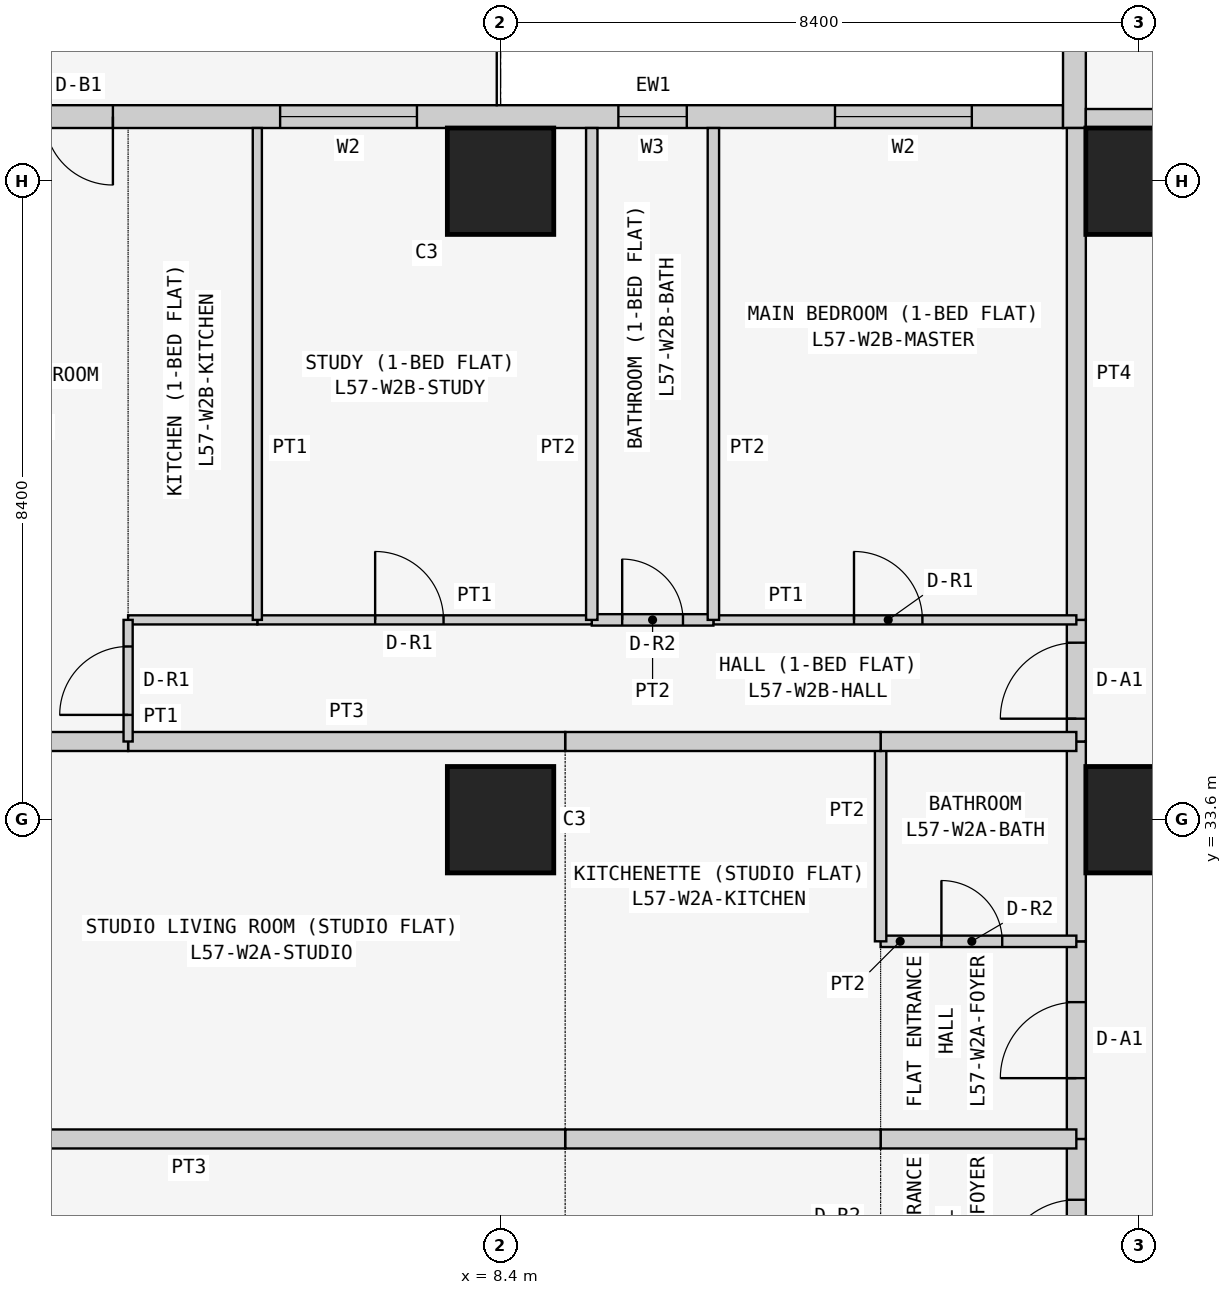
"""IFC4 building model, lengths in metres.
Left out: names, types, materials, properties, quantities, classifications, styles, units other than length and angle.
Written with IfcOpenShell. Run it as: python <this file> out.ifc"""

import sys

from ifc_helpers import new_model, si_unit, direction, frame, frame_2d, origin, origin_2d, place, context, subcontext, project, spatial, rectangle, extrude, element, fill, save


model = new_model("IFC4")
c1 = context("Model", 3, precision=1e-05, world=origin(), true_north=direction((0.0, 1.0)))
c2 = subcontext(c1, "Body", "Model", "MODEL_VIEW")
j1 = project(units=[si_unit("LENGTHUNIT", "METRE"), si_unit("PLANEANGLEUNIT", "RADIAN")], contexts=[c1])
p1 = place(None, origin())
s1 = spatial("IfcSite", under=j1, at=p1, CompositionType="ELEMENT")
p2 = place(p1, origin())
s2 = spatial("IfcBuilding", under=s1, at=p2, CompositionType="ELEMENT")
p3 = place(p2, frame((0.0, 0.0, 219.3)))
s3 = spatial("IfcBuildingStorey", under=s2, at=p3, CompositionType="ELEMENT", Elevation=219.3)
for number, where, z_axis, x_axis in (
    (1, (8.4, 33.6, 0.0), (0.0, 0.0, 1.0), (1.0, 0.0, 0.0)),
    (2, (8.4, 42.0, 0.0), (0.0, 0.0, 1.0), (1.0, 0.0, 0.0)),
    (3, (16.8, 33.6, 0.0), (0.0, 0.0, 1.0), (1.0, 0.0, 0.0)),
    (4, (16.8, 42.0, 0.0), (0.0, 0.0, 1.0), (1.0, 0.0, 0.0)),
):
    element("IfcColumn", number, at=place(p3, frame(where, z_axis=z_axis, x_axis=x_axis)), inside=s3, PredefinedType="COLUMN", context=c2, shape_type="SweptSolid", body=[
        extrude(rectangle(XDim=1.4, YDim=1.4, at=origin_2d()), origin(), (0.0, 0.0, 1.0), 3.6),
    ])
p4 = place(p3, frame((15.8, 42.85, 0.0), z_axis=(0.0, 0.0, 1.0), x_axis=(-1.0, 0.0, 0.0)))
e5 = element("IfcWall", 5, at=p4, inside=s3, PredefinedType="SOLIDWALL", context=c2, shape_type="SweptSolid", body=[
    extrude(rectangle(XDim=15.4, YDim=0.3, at=frame_2d((7.7, 0.0))), origin(), (0.0, 0.0, 1.0), 3.45),
])
p5 = place(p4, frame((1.2, 0.0, 0.9)))
e6 = element("IfcOpeningElement", 6, at=p5, cuts=e5, PredefinedType="OPENING", context=c2, shape_type="SweptSolid", body=[
    extrude(rectangle(XDim=1.8, YDim=1.5, at=frame_2d((0.9, 0.75))), frame((0.0, 0.16, 0.0), z_axis=(0.0, -1.0, 0.0), x_axis=(1.0, 0.0, 0.0)), (0.0, 0.0, 1.0), 0.32),
])
p6 = place(p4, frame((4.95, 0.0, 1.5)))
e7 = element("IfcOpeningElement", 7, at=p6, cuts=e5, PredefinedType="OPENING", context=c2, shape_type="SweptSolid", body=[
    extrude(rectangle(XDim=0.9, YDim=0.7, at=frame_2d((0.45, 0.35))), frame((0.0, 0.16, 0.0), z_axis=(0.0, -1.0, 0.0), x_axis=(1.0, 0.0, 0.0)), (0.0, 0.0, 1.0), 0.32),
])
p7 = place(p4, frame((8.5, 0.0, 0.9)))
e8 = element("IfcOpeningElement", 8, at=p7, cuts=e5, PredefinedType="OPENING", context=c2, shape_type="SweptSolid", body=[
    extrude(rectangle(XDim=1.8, YDim=1.5, at=frame_2d((0.9, 0.75))), frame((0.0, 0.16, 0.0), z_axis=(0.0, -1.0, 0.0), x_axis=(1.0, 0.0, 0.0)), (0.0, 0.0, 1.0), 0.32),
])
p8 = place(p4, frame((12.5, 0.0, 0.0)))
e9 = element("IfcOpeningElement", 9, at=p8, cuts=e5, PredefinedType="OPENING", context=c2, shape_type="SweptSolid", body=[
    extrude(rectangle(XDim=0.9, YDim=2.4, at=frame_2d((0.45, 1.2))), frame((0.0, 0.16, 0.0), z_axis=(0.0, -1.0, 0.0), x_axis=(1.0, 0.0, 0.0)), (0.0, 0.0, 1.0), 0.32),
])
p9 = place(p4, frame((13.5, 0.0, 0.9)))
e10 = element("IfcOpeningElement", 10, at=p9, cuts=e5, PredefinedType="OPENING", context=c2, shape_type="SweptSolid", body=[
    extrude(rectangle(XDim=1.2, YDim=1.5, at=frame_2d((0.6, 0.75))), frame((0.0, 0.16, 0.0), z_axis=(0.0, -1.0, 0.0), x_axis=(1.0, 0.0, 0.0)), (0.0, 0.0, 1.0), 0.32),
])
p10 = place(p3, frame((15.95, 50.0, 0.0), z_axis=(0.0, 0.0, 1.0), x_axis=(0.0, -1.0, 0.0)))
e11 = element("IfcWall", 11, at=p10, inside=s3, PredefinedType="SOLIDWALL", context=c2, shape_type="SweptSolid", body=[
    extrude(rectangle(XDim=7.3, YDim=0.3, at=frame_2d((3.65, 0.0))), origin(), (0.0, 0.0, 1.0), 3.45),
])
p11 = place(p10, frame((3.1, 0.0, 0.9)))
e12 = element("IfcOpeningElement", 12, at=p11, cuts=e11, PredefinedType="OPENING", context=c2, shape_type="SweptSolid", body=[
    extrude(rectangle(XDim=2.4, YDim=1.5, at=frame_2d((1.2, 0.75))), frame((0.0, 0.16, 0.0), z_axis=(0.0, -1.0, 0.0), x_axis=(1.0, 0.0, 0.0)), (0.0, 0.0, 1.0), 0.32),
])
p12 = place(p10, frame((0.75, 0.0, 0.9)))
e13 = element("IfcOpeningElement", 13, at=p12, cuts=e11, PredefinedType="OPENING", context=c2, shape_type="SweptSolid", body=[
    extrude(rectangle(XDim=1.2, YDim=1.5, at=frame_2d((0.6, 0.75))), frame((0.0, 0.16, 0.0), z_axis=(0.0, -1.0, 0.0), x_axis=(1.0, 0.0, 0.0)), (0.0, 0.0, 1.0), 0.32),
])
p13 = place(p3, frame((16.1, 42.825, 0.0), z_axis=(0.0, 0.0, 1.0), x_axis=(1.0, 0.0, 0.0)))
e14 = element("IfcWall", 14, at=p13, inside=s3, PredefinedType="PARTITIONING", context=c2, shape_type="SweptSolid", body=[
    extrude(rectangle(XDim=6.471, YDim=0.25, at=frame_2d((3.235, 0.0))), origin(), (0.0, 0.0, 1.0), 3.45),
])
p14 = place(p3, frame((15.975, 26.8, 0.0), z_axis=(0.0, 0.0, 1.0), x_axis=(0.0, 1.0, 0.0)))
e15 = element("IfcWall", 15, at=p14, inside=s3, PredefinedType="PARTITIONING", context=c2, shape_type="SweptSolid", body=[
    extrude(rectangle(XDim=2.6, YDim=0.25, at=frame_2d((1.3, 0.0))), origin(), (0.0, 0.0, 1.0), 3.45),
])
p15 = place(p14, frame((0.8, 0.0, 0.0)))
e16 = element("IfcOpeningElement", 16, at=p15, cuts=e15, PredefinedType="OPENING", context=c2, shape_type="SweptSolid", body=[
    extrude(rectangle(XDim=1.0, YDim=2.1, at=frame_2d((0.5, 1.05))), frame((0.0, 0.135, 0.0), z_axis=(0.0, -1.0, 0.0), x_axis=(1.0, 0.0, 0.0)), (0.0, 0.0, 1.0), 0.27),
])
p16 = place(p3, frame((15.975, 29.4, 0.0), z_axis=(0.0, 0.0, 1.0), x_axis=(0.0, 1.0, 0.0)))
e17 = element("IfcWall", 17, at=p16, inside=s3, PredefinedType="PARTITIONING", context=c2, shape_type="SweptSolid", body=[
    extrude(rectangle(XDim=2.6, YDim=0.25, at=frame_2d((1.3, 0.0))), origin(), (0.0, 0.0, 1.0), 3.45),
])
p17 = place(p16, frame((0.8, 0.0, 0.0)))
e18 = element("IfcOpeningElement", 18, at=p17, cuts=e17, PredefinedType="OPENING", context=c2, shape_type="SweptSolid", body=[
    extrude(rectangle(XDim=1.0, YDim=2.1, at=frame_2d((0.5, 1.05))), frame((0.0, 0.135, 0.0), z_axis=(0.0, -1.0, 0.0), x_axis=(1.0, 0.0, 0.0)), (0.0, 0.0, 1.0), 0.27),
])
p18 = place(p3, frame((15.975, 32.0, 0.0), z_axis=(0.0, 0.0, 1.0), x_axis=(0.0, 1.0, 0.0)))
e19 = element("IfcWall", 19, at=p18, inside=s3, PredefinedType="PARTITIONING", context=c2, shape_type="SweptSolid", body=[
    extrude(rectangle(XDim=2.629, YDim=0.25, at=frame_2d((1.314, 0.0))), origin(), (0.0, 0.0, 1.0), 3.45),
])
p19 = place(p3, frame((15.975, 34.629, 0.0), z_axis=(0.0, 0.0, 1.0), x_axis=(0.0, 1.0, 0.0)))
e20 = element("IfcWall", 20, at=p19, inside=s3, PredefinedType="PARTITIONING", context=c2, shape_type="SweptSolid", body=[
    extrude(rectangle(XDim=1.6, YDim=0.25, at=frame_2d((0.8, 0.0))), origin(), (0.0, 0.0, 1.0), 3.45),
])
p20 = place(p19, frame((0.3, 0.0, 0.0)))
e21 = element("IfcOpeningElement", 21, at=p20, cuts=e20, PredefinedType="OPENING", context=c2, shape_type="SweptSolid", body=[
    extrude(rectangle(XDim=1.0, YDim=2.1, at=frame_2d((0.5, 1.05))), frame((0.0, 0.135, 0.0), z_axis=(0.0, -1.0, 0.0), x_axis=(1.0, 0.0, 0.0)), (0.0, 0.0, 1.0), 0.27),
])
p21 = place(p3, frame((15.975, 36.229, 0.0), z_axis=(0.0, 0.0, 1.0), x_axis=(0.0, 1.0, 0.0)))
e22 = element("IfcWall", 22, at=p21, inside=s3, PredefinedType="PARTITIONING", context=c2, shape_type="SweptSolid", body=[
    extrude(rectangle(XDim=6.471, YDim=0.25, at=frame_2d((3.235, 0.0))), origin(), (0.0, 0.0, 1.0), 3.45),
])
p22 = place(p3, frame((15.975, 29.4, 0.0), z_axis=(0.0, 0.0, 1.0), x_axis=(-1.0, 0.0, 0.0)))
e23 = element("IfcWall", 23, at=p22, inside=s3, PredefinedType="PARTITIONING", context=c2, shape_type="SweptSolid", body=[
    extrude(rectangle(XDim=2.575, YDim=0.25, at=frame_2d((1.288, 0.0))), origin(), (0.0, 0.0, 1.0), 3.45),
])
p23 = place(p3, frame((13.4, 29.4, 0.0), z_axis=(0.0, 0.0, 1.0), x_axis=(-1.0, 0.0, 0.0)))
e24 = element("IfcWall", 24, at=p23, inside=s3, PredefinedType="PARTITIONING", context=c2, shape_type="SweptSolid", body=[
    extrude(rectangle(XDim=4.15, YDim=0.25, at=frame_2d((2.075, 0.0))), origin(), (0.0, 0.0, 1.0), 3.45),
])
p24 = place(p3, frame((9.25, 29.4, 0.0), z_axis=(0.0, 0.0, 1.0), x_axis=(-1.0, 0.0, 0.0)))
e25 = element("IfcWall", 25, at=p24, inside=s3, PredefinedType="PARTITIONING", context=c2, shape_type="SweptSolid", body=[
    extrude(rectangle(XDim=9.9, YDim=0.25, at=frame_2d((4.95, 0.0))), origin(), (0.0, 0.0, 1.0), 3.45),
])
p25 = place(p3, frame((13.4, 32.0, 0.0), z_axis=(0.0, 0.0, 1.0), x_axis=(1.0, 0.0, 0.0)))
e26 = element("IfcWall", 26, at=p25, inside=s3, PredefinedType="PARTITIONING", context=c2, shape_type="SweptSolid", body=[
    extrude(rectangle(XDim=2.575, YDim=0.15, at=frame_2d((1.288, 0.0))), origin(), (0.0, 0.0, 1.0), 3.45),
])
p26 = place(p25, frame((0.8, 0.0, 0.0)))
e27 = element("IfcOpeningElement", 27, at=p26, cuts=e26, PredefinedType="OPENING", context=c2, shape_type="SweptSolid", body=[
    extrude(rectangle(XDim=0.8, YDim=2.1, at=frame_2d((0.4, 1.05))), frame((0.0, 0.085, 0.0), z_axis=(0.0, -1.0, 0.0), x_axis=(1.0, 0.0, 0.0)), (0.0, 0.0, 1.0), 0.17),
])
p27 = place(p3, frame((13.4, 32.0, 0.0), z_axis=(0.0, 0.0, 1.0), x_axis=(0.0, 1.0, 0.0)))
e28 = element("IfcWall", 28, at=p27, inside=s3, PredefinedType="PARTITIONING", context=c2, shape_type="SweptSolid", body=[
    extrude(rectangle(XDim=2.629, YDim=0.15, at=frame_2d((1.314, 0.0))), origin(), (0.0, 0.0, 1.0), 3.45),
])
p28 = place(p3, frame((13.4, 34.629, 0.0), z_axis=(0.0, 0.0, 1.0), x_axis=(1.0, 0.0, 0.0)))
e29 = element("IfcWall", 29, at=p28, inside=s3, PredefinedType="PARTITIONING", context=c2, shape_type="SweptSolid", body=[
    extrude(rectangle(XDim=2.575, YDim=0.25, at=frame_2d((1.288, 0.0))), origin(), (0.0, 0.0, 1.0), 3.45),
])
p29 = place(p3, frame((9.25, 34.629, 0.0), z_axis=(0.0, 0.0, 1.0), x_axis=(1.0, 0.0, 0.0)))
e30 = element("IfcWall", 30, at=p29, inside=s3, PredefinedType="PARTITIONING", context=c2, shape_type="SweptSolid", body=[
    extrude(rectangle(XDim=4.15, YDim=0.25, at=frame_2d((2.075, 0.0))), origin(), (0.0, 0.0, 1.0), 3.45),
])
p30 = place(p3, frame((3.5, 34.629, 0.0), z_axis=(0.0, 0.0, 1.0), x_axis=(1.0, 0.0, 0.0)))
e31 = element("IfcWall", 31, at=p30, inside=s3, PredefinedType="PARTITIONING", context=c2, shape_type="SweptSolid", body=[
    extrude(rectangle(XDim=5.75, YDim=0.25, at=frame_2d((2.875, 0.0))), origin(), (0.0, 0.0, 1.0), 3.45),
])
p31 = place(p3, frame((-0.65, 34.629, 0.0), z_axis=(0.0, 0.0, 1.0), x_axis=(1.0, 0.0, 0.0)))
e32 = element("IfcWall", 32, at=p31, inside=s3, PredefinedType="PARTITIONING", context=c2, shape_type="SweptSolid", body=[
    extrude(rectangle(XDim=4.15, YDim=0.25, at=frame_2d((2.075, 0.0))), origin(), (0.0, 0.0, 1.0), 3.45),
])
p32 = place(p3, frame((11.2, 36.229, 0.0), z_axis=(0.0, 0.0, 1.0), x_axis=(1.0, 0.0, 0.0)))
e33 = element("IfcWall", 33, at=p32, inside=s3, PredefinedType="PARTITIONING", context=c2, shape_type="SweptSolid", body=[
    extrude(rectangle(XDim=4.775, YDim=0.12, at=frame_2d((2.388, 0.0))), origin(), (0.0, 0.0, 1.0), 3.45),
])
p33 = place(p32, frame((1.85, 0.0, 0.0)))
e34 = element("IfcOpeningElement", 34, at=p33, cuts=e33, PredefinedType="OPENING", context=c2, shape_type="SweptSolid", body=[
    extrude(rectangle(XDim=0.9, YDim=2.1, at=frame_2d((0.45, 1.05))), frame((0.0, 0.07, 0.0), z_axis=(0.0, -1.0, 0.0), x_axis=(1.0, 0.0, 0.0)), (0.0, 0.0, 1.0), 0.14),
])
p34 = place(p3, frame((9.6, 36.229, 0.0), z_axis=(0.0, 0.0, 1.0), x_axis=(1.0, 0.0, 0.0)))
e35 = element("IfcWall", 35, at=p34, inside=s3, PredefinedType="PARTITIONING", context=c2, shape_type="SweptSolid", body=[
    extrude(rectangle(XDim=1.6, YDim=0.15, at=frame_2d((0.8, 0.0))), origin(), (0.0, 0.0, 1.0), 3.45),
])
p35 = place(p34, frame((0.4, 0.0, 0.0)))
e36 = element("IfcOpeningElement", 36, at=p35, cuts=e35, PredefinedType="OPENING", context=c2, shape_type="SweptSolid", body=[
    extrude(rectangle(XDim=0.8, YDim=2.1, at=frame_2d((0.4, 1.05))), frame((0.0, 0.085, 0.0), z_axis=(0.0, -1.0, 0.0), x_axis=(1.0, 0.0, 0.0)), (0.0, 0.0, 1.0), 0.17),
])
p36 = place(p3, frame((5.2, 36.229, 0.0), z_axis=(0.0, 0.0, 1.0), x_axis=(1.0, 0.0, 0.0)))
e37 = element("IfcWall", 37, at=p36, inside=s3, PredefinedType="PARTITIONING", context=c2, shape_type="SweptSolid", body=[
    extrude(rectangle(XDim=4.4, YDim=0.12, at=frame_2d((2.2, 0.0))), origin(), (0.0, 0.0, 1.0), 3.45),
])
p37 = place(p36, frame((1.55, 0.0, 0.0)))
e38 = element("IfcOpeningElement", 38, at=p37, cuts=e37, PredefinedType="OPENING", context=c2, shape_type="SweptSolid", body=[
    extrude(rectangle(XDim=0.9, YDim=2.1, at=frame_2d((0.45, 1.05))), frame((0.0, 0.07, 0.0), z_axis=(0.0, -1.0, 0.0), x_axis=(1.0, 0.0, 0.0)), (0.0, 0.0, 1.0), 0.14),
])
p38 = place(p3, frame((3.5, 36.229, 0.0), z_axis=(0.0, 0.0, 1.0), x_axis=(1.0, 0.0, 0.0)))
e39 = element("IfcWall", 39, at=p38, inside=s3, PredefinedType="PARTITIONING", context=c2, shape_type="SweptSolid", body=[
    extrude(rectangle(XDim=1.7, YDim=0.12, at=frame_2d((0.85, 0.0))), origin(), (0.0, 0.0, 1.0), 3.45),
])
p39 = place(p3, frame((3.5, 34.629, 0.0), z_axis=(0.0, 0.0, 1.0), x_axis=(0.0, 1.0, 0.0)))
e40 = element("IfcWall", 40, at=p39, inside=s3, PredefinedType="PARTITIONING", context=c2, shape_type="SweptSolid", body=[
    extrude(rectangle(XDim=1.6, YDim=0.12, at=frame_2d((0.8, 0.0))), origin(), (0.0, 0.0, 1.0), 3.45),
])
p40 = place(p39, frame((0.35, 0.0, 0.0)))
e41 = element("IfcOpeningElement", 41, at=p40, cuts=e40, PredefinedType="OPENING", context=c2, shape_type="SweptSolid", body=[
    extrude(rectangle(XDim=0.9, YDim=2.1, at=frame_2d((0.45, 1.05))), frame((0.0, 0.07, 0.0), z_axis=(0.0, -1.0, 0.0), x_axis=(1.0, 0.0, 0.0)), (0.0, 0.0, 1.0), 0.14),
])
for number, where, z_axis, x_axis in (
    (42, (11.2, 36.229, 0.0), (0.0, 0.0, 1.0), (0.0, 1.0, 0.0)),
    (43, (9.6, 36.229, 0.0), (0.0, 0.0, 1.0), (0.0, 1.0, 0.0)),
):
    element("IfcWall", number, at=place(p3, frame(where, z_axis=z_axis, x_axis=x_axis)), inside=s3, PredefinedType="PARTITIONING", context=c2, shape_type="SweptSolid", body=[
        extrude(rectangle(XDim=6.471, YDim=0.15, at=frame_2d((3.235, 0.0))), origin(), (0.0, 0.0, 1.0), 3.45),
    ])
p41 = place(p3, frame((5.2, 36.229, 0.0), z_axis=(0.0, 0.0, 1.0), x_axis=(0.0, 1.0, 0.0)))
e44 = element("IfcWall", 44, at=p41, inside=s3, PredefinedType="PARTITIONING", context=c2, shape_type="SweptSolid", body=[
    extrude(rectangle(XDim=6.471, YDim=0.12, at=frame_2d((3.235, 0.0))), origin(), (0.0, 0.0, 1.0), 3.45),
])
p42 = place(p5, origin())
e45 = element("IfcWindow", 45, at=p42, inside=s3, PartitioningType="SINGLE_PANEL", PredefinedType="WINDOW", context=c2, shape_type="SweptSolid", body=[
    extrude(rectangle(XDim=1.8, YDim=1.5, at=frame_2d((0.9, 0.75))), frame((0.0, 0.03, 0.0), z_axis=(0.0, -1.0, 0.0), x_axis=(1.0, 0.0, 0.0)), (0.0, 0.0, 1.0), 0.06),
])
fill(e6, e45)
p43 = place(p6, origin())
e46 = element("IfcWindow", 46, at=p43, inside=s3, PartitioningType="SINGLE_PANEL", PredefinedType="WINDOW", context=c2, shape_type="SweptSolid", body=[
    extrude(rectangle(XDim=0.9, YDim=0.7, at=frame_2d((0.45, 0.35))), frame((0.0, 0.03, 0.0), z_axis=(0.0, -1.0, 0.0), x_axis=(1.0, 0.0, 0.0)), (0.0, 0.0, 1.0), 0.06),
])
fill(e7, e46)
p44 = place(p7, origin())
e47 = element("IfcWindow", 47, at=p44, inside=s3, PartitioningType="SINGLE_PANEL", PredefinedType="WINDOW", context=c2, shape_type="SweptSolid", body=[
    extrude(rectangle(XDim=1.8, YDim=1.5, at=frame_2d((0.9, 0.75))), frame((0.0, 0.03, 0.0), z_axis=(0.0, -1.0, 0.0), x_axis=(1.0, 0.0, 0.0)), (0.0, 0.0, 1.0), 0.06),
])
fill(e8, e47)
p45 = place(p8, origin())
e48 = element("IfcDoor", 48, at=p45, inside=s3, OperationType="SINGLE_SWING_LEFT", PredefinedType="DOOR", context=c2, shape_type="SweptSolid", body=[
    extrude(rectangle(XDim=0.9, YDim=2.4, at=frame_2d((0.45, 1.2))), frame((0.0, 0.025, 0.0), z_axis=(0.0, -1.0, 0.0), x_axis=(1.0, 0.0, 0.0)), (0.0, 0.0, 1.0), 0.05),
])
fill(e9, e48)
p46 = place(p15, origin())
e49 = element("IfcDoor", 49, at=p46, inside=s3, OperationType="SINGLE_SWING_LEFT", PredefinedType="DOOR", context=c2, shape_type="SweptSolid", body=[
    extrude(rectangle(XDim=1.0, YDim=2.1, at=frame_2d((0.5, 1.05))), frame((0.0, 0.025, 0.0), z_axis=(0.0, -1.0, 0.0), x_axis=(1.0, 0.0, 0.0)), (0.0, 0.0, 1.0), 0.05),
])
fill(e16, e49)
p47 = place(p17, origin())
e50 = element("IfcDoor", 50, at=p47, inside=s3, OperationType="SINGLE_SWING_LEFT", PredefinedType="DOOR", context=c2, shape_type="SweptSolid", body=[
    extrude(rectangle(XDim=1.0, YDim=2.1, at=frame_2d((0.5, 1.05))), frame((0.0, 0.025, 0.0), z_axis=(0.0, -1.0, 0.0), x_axis=(1.0, 0.0, 0.0)), (0.0, 0.0, 1.0), 0.05),
])
fill(e18, e50)
p48 = place(p26, origin())
e51 = element("IfcDoor", 51, at=p48, inside=s3, OperationType="SINGLE_SWING_LEFT", PredefinedType="DOOR", context=c2, shape_type="SweptSolid", body=[
    extrude(rectangle(XDim=0.8, YDim=2.1, at=frame_2d((0.4, 1.05))), frame((0.0, 0.025, 0.0), z_axis=(0.0, -1.0, 0.0), x_axis=(1.0, 0.0, 0.0)), (0.0, 0.0, 1.0), 0.05),
])
fill(e27, e51)
p49 = place(p20, origin())
e52 = element("IfcDoor", 52, at=p49, inside=s3, OperationType="SINGLE_SWING_LEFT", PredefinedType="DOOR", context=c2, shape_type="SweptSolid", body=[
    extrude(rectangle(XDim=1.0, YDim=2.1, at=frame_2d((0.5, 1.05))), frame((0.0, 0.025, 0.0), z_axis=(0.0, -1.0, 0.0), x_axis=(1.0, 0.0, 0.0)), (0.0, 0.0, 1.0), 0.05),
])
fill(e21, e52)
p50 = place(p33, origin())
e53 = element("IfcDoor", 53, at=p50, inside=s3, OperationType="SINGLE_SWING_LEFT", PredefinedType="DOOR", context=c2, shape_type="SweptSolid", body=[
    extrude(rectangle(XDim=0.9, YDim=2.1, at=frame_2d((0.45, 1.05))), frame((0.0, 0.025, 0.0), z_axis=(0.0, -1.0, 0.0), x_axis=(1.0, 0.0, 0.0)), (0.0, 0.0, 1.0), 0.05),
])
fill(e34, e53)
p51 = place(p35, origin())
e54 = element("IfcDoor", 54, at=p51, inside=s3, OperationType="SINGLE_SWING_LEFT", PredefinedType="DOOR", context=c2, shape_type="SweptSolid", body=[
    extrude(rectangle(XDim=0.8, YDim=2.1, at=frame_2d((0.4, 1.05))), frame((0.0, 0.025, 0.0), z_axis=(0.0, -1.0, 0.0), x_axis=(1.0, 0.0, 0.0)), (0.0, 0.0, 1.0), 0.05),
])
fill(e36, e54)
p52 = place(p37, origin())
e55 = element("IfcDoor", 55, at=p52, inside=s3, OperationType="SINGLE_SWING_LEFT", PredefinedType="DOOR", context=c2, shape_type="SweptSolid", body=[
    extrude(rectangle(XDim=0.9, YDim=2.1, at=frame_2d((0.45, 1.05))), frame((0.0, 0.025, 0.0), z_axis=(0.0, -1.0, 0.0), x_axis=(1.0, 0.0, 0.0)), (0.0, 0.0, 1.0), 0.05),
])
fill(e38, e55)
p53 = place(p40, origin())
e56 = element("IfcDoor", 56, at=p53, inside=s3, OperationType="SINGLE_SWING_LEFT", PredefinedType="DOOR", context=c2, shape_type="SweptSolid", body=[
    extrude(rectangle(XDim=0.9, YDim=2.1, at=frame_2d((0.45, 1.05))), frame((0.0, 0.025, 0.0), z_axis=(0.0, -1.0, 0.0), x_axis=(1.0, 0.0, 0.0)), (0.0, 0.0, 1.0), 0.05),
])
fill(e41, e56)
save(model, sys.argv[1])
